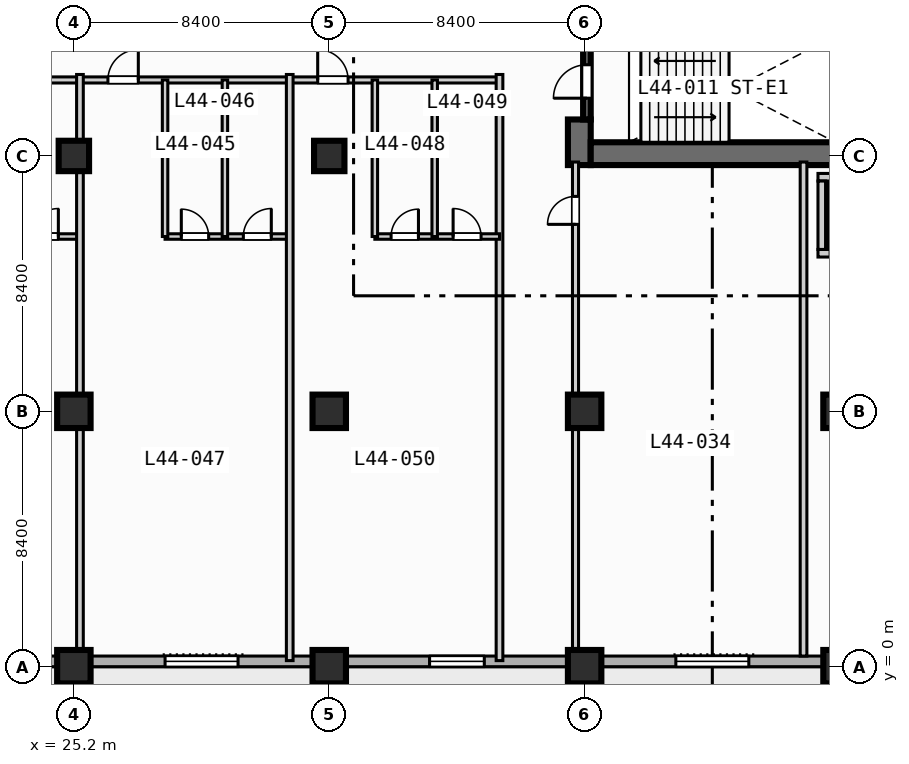
"""IFC4 building model, lengths in metres.
Left out: names, types, materials, properties, quantities, classifications, styles, units other than length and angle.
Written with IfcOpenShell. Run it as: python <this file> out.ifc"""

import sys

from ifc_helpers import new_model, si_unit, direction, frame, frame_2d, origin, origin_2d, place, context, subcontext, project, spatial, rectangle, extrude, element, fill, save


model = new_model("IFC4")
c1 = context("Model", 3, precision=1e-05, world=origin(), true_north=direction((0.0, 1.0)))
c2 = subcontext(c1, "Body", "Model", "MODEL_VIEW")
j1 = project(units=[si_unit("LENGTHUNIT", "METRE"), si_unit("PLANEANGLEUNIT", "RADIAN")], contexts=[c1])
p1 = place(None, origin())
s1 = spatial("IfcSite", under=j1, at=p1, CompositionType="ELEMENT")
p2 = place(p1, origin())
s2 = spatial("IfcBuilding", under=s1, at=p2, CompositionType="ELEMENT")
p3 = place(p2, frame((0.0, 0.0, 182.8)))
s3 = spatial("IfcBuildingStorey", under=s2, at=p3, CompositionType="ELEMENT", Elevation=182.8)
p4 = place(p3, frame((41.825, 16.5, 0.0), z_axis=(0.0, 0.0, 1.0), x_axis=(0.0, 1.0, 0.0)))
e1 = element("IfcWall", 1, at=p4, inside=s3, PredefinedType="SHEAR", context=c2, shape_type="SweptSolid", body=[
    extrude(rectangle(XDim=1.5, YDim=0.75, at=frame_2d((0.75, 0.0))), origin(), (0.0, 0.0, 1.0), 3.47),
])
p5 = place(p3, frame((42.2, 16.875, 0.0), z_axis=(0.0, 0.0, 1.0), x_axis=(1.0, 0.0, 0.0)))
e2 = element("IfcWall", 2, at=p5, inside=s3, PredefinedType="SHEAR", context=c2, shape_type="SweptSolid", body=[
    extrude(rectangle(XDim=16.35, YDim=0.75, at=frame_2d((8.175, 0.0))), origin(), (0.0, 0.0, 1.0), 3.47),
])
for number, where, z_axis, x_axis in (
    (3, (25.2, 0.0, 0.0), (0.0, 0.0, 1.0), (1.0, 0.0, 0.0)),
    (4, (25.2, 8.4, 0.0), (0.0, 0.0, 1.0), (1.0, 0.0, 0.0)),
):
    element("IfcColumn", number, at=place(p3, frame(where, z_axis=z_axis, x_axis=x_axis)), inside=s3, PredefinedType="COLUMN", context=c2, shape_type="SweptSolid", body=[
        extrude(rectangle(XDim=1.1, YDim=1.1, at=origin_2d()), origin(), (0.0, 0.0, 1.0), 3.7),
    ])
p6 = place(p3, frame((25.2, 16.8, 0.0), z_axis=(0.0, 0.0, 1.0), x_axis=(1.0, 0.0, 0.0)))
e5 = element("IfcColumn", 5, at=p6, inside=s3, PredefinedType="COLUMN", context=c2, shape_type="SweptSolid", body=[
    extrude(rectangle(XDim=1.0, YDim=1.0, at=origin_2d()), origin(), (0.0, 0.0, 1.0), 3.7),
])
for number, where, z_axis, x_axis in (
    (6, (33.6, 0.0, 0.0), (0.0, 0.0, 1.0), (1.0, 0.0, 0.0)),
    (7, (33.6, 8.4, 0.0), (0.0, 0.0, 1.0), (1.0, 0.0, 0.0)),
):
    element("IfcColumn", number, at=place(p3, frame(where, z_axis=z_axis, x_axis=x_axis)), inside=s3, PredefinedType="COLUMN", context=c2, shape_type="SweptSolid", body=[
        extrude(rectangle(XDim=1.1, YDim=1.1, at=origin_2d()), origin(), (0.0, 0.0, 1.0), 3.7),
    ])
p7 = place(p3, frame((33.6, 16.8, 0.0), z_axis=(0.0, 0.0, 1.0), x_axis=(1.0, 0.0, 0.0)))
e8 = element("IfcColumn", 8, at=p7, inside=s3, PredefinedType="COLUMN", context=c2, shape_type="SweptSolid", body=[
    extrude(rectangle(XDim=1.0, YDim=1.0, at=origin_2d()), origin(), (0.0, 0.0, 1.0), 3.7),
])
for number, where, z_axis, x_axis in (
    (9, (42.0, 0.0, 0.0), (0.0, 0.0, 1.0), (1.0, 0.0, 0.0)),
    (10, (42.0, 8.4, 0.0), (0.0, 0.0, 1.0), (1.0, 0.0, 0.0)),
    (11, (50.4, 0.0, 0.0), (0.0, 0.0, 1.0), (1.0, 0.0, 0.0)),
    (12, (50.4, 8.4, 0.0), (0.0, 0.0, 1.0), (1.0, 0.0, 0.0)),
):
    element("IfcColumn", number, at=place(p3, frame(where, z_axis=z_axis, x_axis=x_axis)), inside=s3, PredefinedType="COLUMN", context=c2, shape_type="SweptSolid", body=[
        extrude(rectangle(XDim=1.1, YDim=1.1, at=origin_2d()), origin(), (0.0, 0.0, 1.0), 3.7),
    ])
p8 = place(p3, frame((72.425, 0.175, 0.0), z_axis=(0.0, 0.0, 1.0), x_axis=(-1.0, 0.0, 0.0)))
e13 = element("IfcWall", 13, at=p8, inside=s3, PredefinedType="STANDARD", context=c2, shape_type="SweptSolid", body=[
    extrude(rectangle(XDim=69.25, YDim=0.35, at=frame_2d((34.625, 0.0))), origin(), (0.0, 0.0, 1.0), 3.47),
])
p9 = place(p8, frame((50.725, 0.0, 0.0)))
e14 = element("IfcOpeningElement", 14, at=p9, cuts=e13, PredefinedType="OPENING", context=c2, shape_type="SweptSolid", body=[
    extrude(rectangle(XDim=1.4, YDim=2.2, at=frame_2d((0.7, 1.1))), frame((0.0, 0.185, 0.0), z_axis=(0.0, -1.0, 0.0), x_axis=(1.0, 0.0, 0.0)), (0.0, 0.0, 1.0), 0.37),
])
p10 = place(p8, frame((58.625, 0.0, 0.85)))
e15 = element("IfcOpeningElement", 15, at=p10, cuts=e13, PredefinedType="OPENING", context=c2, shape_type="SweptSolid", body=[
    extrude(rectangle(XDim=2.4, YDim=1.95, at=frame_2d((1.2, 0.975))), frame((0.0, 0.185, 0.0), z_axis=(0.0, -1.0, 0.0), x_axis=(1.0, 0.0, 0.0)), (0.0, 0.0, 1.0), 0.37),
])
p11 = place(p8, frame((41.825, 0.0, 0.85)))
e16 = element("IfcOpeningElement", 16, at=p11, cuts=e13, PredefinedType="OPENING", context=c2, shape_type="SweptSolid", body=[
    extrude(rectangle(XDim=2.4, YDim=1.95, at=frame_2d((1.2, 0.975))), frame((0.0, 0.185, 0.0), z_axis=(0.0, -1.0, 0.0), x_axis=(1.0, 0.0, 0.0)), (0.0, 0.0, 1.0), 0.37),
])
p12 = place(p8, frame((33.725, 0.0, 0.85)))
e17 = element("IfcOpeningElement", 17, at=p12, cuts=e13, PredefinedType="OPENING", context=c2, shape_type="SweptSolid", body=[
    extrude(rectangle(XDim=1.8, YDim=1.8, at=frame_2d((0.9, 0.9))), frame((0.0, 0.185, 0.0), z_axis=(0.0, -1.0, 0.0), x_axis=(1.0, 0.0, 0.0)), (0.0, 0.0, 1.0), 0.37),
])
p13 = place(p8, frame((25.025, 0.0, 0.85)))
e18 = element("IfcOpeningElement", 18, at=p13, cuts=e13, PredefinedType="OPENING", context=c2, shape_type="SweptSolid", body=[
    extrude(rectangle(XDim=2.4, YDim=1.95, at=frame_2d((1.2, 0.975))), frame((0.0, 0.185, 0.0), z_axis=(0.0, -1.0, 0.0), x_axis=(1.0, 0.0, 0.0)), (0.0, 0.0, 1.0), 0.37),
])
p14 = place(p8, frame((67.075, 0.0, 0.85)))
e19 = element("IfcOpeningElement", 19, at=p14, cuts=e13, PredefinedType="OPENING", context=c2, shape_type="SweptSolid", body=[
    extrude(rectangle(XDim=1.8, YDim=1.8, at=frame_2d((0.9, 0.9))), frame((0.0, 0.185, 0.0), z_axis=(0.0, -1.0, 0.0), x_axis=(1.0, 0.0, 0.0)), (0.0, 0.0, 1.0), 0.37),
])
p15 = place(p8, frame((56.39, 0.0, 0.85)))
e20 = element("IfcOpeningElement", 20, at=p15, cuts=e13, PredefinedType="OPENING", context=c2, shape_type="SweptSolid", body=[
    extrude(rectangle(XDim=0.72, YDim=1.8, at=frame_2d((0.36, 0.9))), frame((0.0, 0.185, 0.0), z_axis=(0.0, -1.0, 0.0), x_axis=(1.0, 0.0, 0.0)), (0.0, 0.0, 1.0), 0.37),
])
p16 = place(p8, frame((9.075, 0.0, 0.85)))
e21 = element("IfcOpeningElement", 21, at=p16, cuts=e13, PredefinedType="OPENING", context=c2, shape_type="SweptSolid", body=[
    extrude(rectangle(XDim=1.8, YDim=1.8, at=frame_2d((0.9, 0.9))), frame((0.0, 0.185, 0.0), z_axis=(0.0, -1.0, 0.0), x_axis=(1.0, 0.0, 0.0)), (0.0, 0.0, 1.0), 0.37),
])
p17 = place(p8, frame((2.675, 0.0, 0.85)))
e22 = element("IfcOpeningElement", 22, at=p17, cuts=e13, PredefinedType="OPENING", context=c2, shape_type="SweptSolid", body=[
    extrude(rectangle(XDim=1.8, YDim=1.8, at=frame_2d((0.9, 0.9))), frame((0.0, 0.185, 0.0), z_axis=(0.0, -1.0, 0.0), x_axis=(1.0, 0.0, 0.0)), (0.0, 0.0, 1.0), 0.37),
])
p18 = place(p3, frame((42.075, 18.0, 0.0), z_axis=(0.0, 0.0, 1.0), x_axis=(0.0, 1.0, 0.0)))
e23 = element("IfcWall", 23, at=p18, inside=s3, PredefinedType="SOLIDWALL", context=c2, shape_type="SweptSolid", body=[
    extrude(rectangle(XDim=2.5, YDim=0.25, at=frame_2d((1.25, 0.0))), origin(), (0.0, 0.0, 1.0), 3.47),
])
p19 = place(p18, frame((0.7, 0.0, 0.0)))
e24 = element("IfcOpeningElement", 24, at=p19, cuts=e23, PredefinedType="OPENING", context=c2, shape_type="SweptSolid", body=[
    extrude(rectangle(XDim=1.1, YDim=2.15, at=frame_2d((0.55, 1.075))), frame((0.0, 0.135, 0.0), z_axis=(0.0, -1.0, 0.0), x_axis=(1.0, 0.0, 0.0)), (0.0, 0.0, 1.0), 0.27),
])
p20 = place(p3, frame((49.675, 13.6, 0.0), z_axis=(0.0, 0.0, 1.0), x_axis=(1.0, 0.0, 0.0)))
e25 = element("IfcWall", 25, at=p20, inside=s3, PredefinedType="SOLIDWALL", context=c2, shape_type="SweptSolid", body=[
    extrude(rectangle(XDim=2.25, YDim=0.25, at=frame_2d((1.125, 0.0))), origin(), (0.0, 0.0, 1.0), 3.47),
])
p21 = place(p20, frame((0.4, 0.0, 0.0)))
e26 = element("IfcOpeningElement", 26, at=p21, cuts=e25, PredefinedType="OPENING", context=c2, shape_type="SweptSolid", body=[
    extrude(rectangle(XDim=1.1, YDim=2.15, at=frame_2d((0.55, 1.075))), frame((0.0, 0.135, 0.0), z_axis=(0.0, -1.0, 0.0), x_axis=(1.0, 0.0, 0.0)), (0.0, 0.0, 1.0), 0.27),
])
for number, where, z_axis, x_axis in (
    (27, (49.675, 16.1, 0.0), (0.0, 0.0, 1.0), (1.0, 0.0, 0.0)),
    (28, (49.8, 13.725, 0.0), (0.0, 0.0, 1.0), (0.0, 1.0, 0.0)),
):
    element("IfcWall", number, at=place(p3, frame(where, z_axis=z_axis, x_axis=x_axis)), inside=s3, PredefinedType="SOLIDWALL", context=c2, shape_type="SweptSolid", body=[
        extrude(rectangle(XDim=2.25, YDim=0.25, at=frame_2d((1.125, 0.0))), origin(), (0.0, 0.0, 1.0), 3.47),
    ])
p22 = place(p3, frame((41.7, 0.35, 0.0), z_axis=(0.0, 0.0, 1.0), x_axis=(0.0, 1.0, 0.0)))
e29 = element("IfcWall", 29, at=p22, inside=s3, PredefinedType="PARTITIONING", context=c2, shape_type="SweptSolid", body=[
    extrude(rectangle(XDim=16.25, YDim=0.2, at=frame_2d((8.125, 0.0))), origin(), (0.0, 0.0, 1.0), 2.82),
])
p23 = place(p22, frame((14.2, 0.0, 0.0)))
e30 = element("IfcOpeningElement", 30, at=p23, cuts=e29, PredefinedType="OPENING", context=c2, shape_type="SweptSolid", body=[
    extrude(rectangle(XDim=0.92, YDim=2.1, at=frame_2d((0.46, 1.05))), frame((0.0, 0.11, 0.0), z_axis=(0.0, -1.0, 0.0), x_axis=(1.0, 0.0, 0.0)), (0.0, 0.0, 1.0), 0.22),
])
p24 = place(p3, frame((49.2, 0.35, 0.0), z_axis=(0.0, 0.0, 1.0), x_axis=(0.0, 1.0, 0.0)))
e31 = element("IfcWall", 31, at=p24, inside=s3, PredefinedType="PARTITIONING", context=c2, shape_type="SweptSolid", body=[
    extrude(rectangle(XDim=16.25, YDim=0.22, at=frame_2d((8.125, 0.0))), origin(), (0.0, 0.0, 1.0), 3.47),
])
p25 = place(p3, frame((3.4, 19.3, 0.0), z_axis=(0.0, 0.0, 1.0), x_axis=(1.0, 0.0, 0.0)))
e32 = element("IfcWall", 32, at=p25, inside=s3, PredefinedType="PARTITIONING", context=c2, shape_type="SweptSolid", body=[
    extrude(rectangle(XDim=35.8, YDim=0.2, at=frame_2d((17.9, 0.0))), origin(), (0.0, 0.0, 1.0), 3.47),
])
p26 = place(p25, frame((3.92, 0.0, 0.0)))
e33 = element("IfcOpeningElement", 33, at=p26, cuts=e32, PredefinedType="OPENING", context=c2, shape_type="SweptSolid", body=[
    extrude(rectangle(XDim=1.0, YDim=2.15, at=frame_2d((0.5, 1.075))), frame((0.0, 0.11, 0.0), z_axis=(0.0, -1.0, 0.0), x_axis=(1.0, 0.0, 0.0)), (0.0, 0.0, 1.0), 0.22),
])
p27 = place(p25, frame((14.945, 0.0, 0.0)))
e34 = element("IfcOpeningElement", 34, at=p27, cuts=e32, PredefinedType="OPENING", context=c2, shape_type="SweptSolid", body=[
    extrude(rectangle(XDim=1.0, YDim=2.15, at=frame_2d((0.5, 1.075))), frame((0.0, 0.11, 0.0), z_axis=(0.0, -1.0, 0.0), x_axis=(1.0, 0.0, 0.0)), (0.0, 0.0, 1.0), 0.22),
])
p28 = place(p25, frame((22.92, 0.0, 0.0)))
e35 = element("IfcOpeningElement", 35, at=p28, cuts=e32, PredefinedType="OPENING", context=c2, shape_type="SweptSolid", body=[
    extrude(rectangle(XDim=1.0, YDim=2.15, at=frame_2d((0.5, 1.075))), frame((0.0, 0.11, 0.0), z_axis=(0.0, -1.0, 0.0), x_axis=(1.0, 0.0, 0.0)), (0.0, 0.0, 1.0), 0.22),
])
p29 = place(p25, frame((29.82, 0.0, 0.0)))
e36 = element("IfcOpeningElement", 36, at=p29, cuts=e32, PredefinedType="OPENING", context=c2, shape_type="SweptSolid", body=[
    extrude(rectangle(XDim=1.0, YDim=2.15, at=frame_2d((0.5, 1.075))), frame((0.0, 0.11, 0.0), z_axis=(0.0, -1.0, 0.0), x_axis=(1.0, 0.0, 0.0)), (0.0, 0.0, 1.0), 0.22),
])
p30 = place(p3, frame((20.9, 14.15, 0.0), z_axis=(0.0, 0.0, 1.0), x_axis=(1.0, 0.0, 0.0)))
e37 = element("IfcWall", 37, at=p30, inside=s3, PredefinedType="PLUMBINGWALL", context=c2, shape_type="SweptSolid", body=[
    extrude(rectangle(XDim=4.5, YDim=0.18, at=frame_2d((2.25, 0.0))), origin(), (0.0, 0.0, 1.0), 3.47),
])
p31 = place(p30, frame((0.63, 0.0, 0.0)))
e38 = element("IfcOpeningElement", 38, at=p31, cuts=e37, PredefinedType="OPENING", context=c2, shape_type="SweptSolid", body=[
    extrude(rectangle(XDim=0.9, YDim=2.1, at=frame_2d((0.45, 1.05))), frame((0.0, 0.1, 0.0), z_axis=(0.0, -1.0, 0.0), x_axis=(1.0, 0.0, 0.0)), (0.0, 0.0, 1.0), 0.2),
])
p32 = place(p30, frame((2.87, 0.0, 0.0)))
e39 = element("IfcOpeningElement", 39, at=p32, cuts=e37, PredefinedType="OPENING", context=c2, shape_type="SweptSolid", body=[
    extrude(rectangle(XDim=0.92, YDim=2.1, at=frame_2d((0.46, 1.05))), frame((0.0, 0.1, 0.0), z_axis=(0.0, -1.0, 0.0), x_axis=(1.0, 0.0, 0.0)), (0.0, 0.0, 1.0), 0.2),
])
p33 = place(p3, frame((25.4, 0.2, 0.0), z_axis=(0.0, 0.0, 1.0), x_axis=(0.0, 1.0, 0.0)))
e40 = element("IfcWall", 40, at=p33, inside=s3, PredefinedType="PARTITIONING", context=c2, shape_type="SweptSolid", body=[
    extrude(rectangle(XDim=19.28, YDim=0.22, at=frame_2d((9.64, 0.0))), origin(), (0.0, 0.0, 1.0), 2.82),
])
p34 = place(p3, frame((28.2, 14.15, 0.0), z_axis=(0.0, 0.0, 1.0), x_axis=(1.0, 0.0, 0.0)))
e41 = element("IfcWall", 41, at=p34, inside=s3, PredefinedType="PLUMBINGWALL", context=c2, shape_type="SweptSolid", body=[
    extrude(rectangle(XDim=4.1, YDim=0.18, at=frame_2d((2.05, 0.0))), origin(), (0.0, 0.0, 1.0), 3.47),
])
p35 = place(p34, frame((0.534, 0.0, 0.0)))
e42 = element("IfcOpeningElement", 42, at=p35, cuts=e41, PredefinedType="OPENING", context=c2, shape_type="SweptSolid", body=[
    extrude(rectangle(XDim=0.9, YDim=2.1, at=frame_2d((0.45, 1.05))), frame((0.0, 0.1, 0.0), z_axis=(0.0, -1.0, 0.0), x_axis=(1.0, 0.0, 0.0)), (0.0, 0.0, 1.0), 0.2),
])
p36 = place(p34, frame((2.574, 0.0, 0.0)))
e43 = element("IfcOpeningElement", 43, at=p36, cuts=e41, PredefinedType="OPENING", context=c2, shape_type="SweptSolid", body=[
    extrude(rectangle(XDim=0.92, YDim=2.1, at=frame_2d((0.46, 1.05))), frame((0.0, 0.1, 0.0), z_axis=(0.0, -1.0, 0.0), x_axis=(1.0, 0.0, 0.0)), (0.0, 0.0, 1.0), 0.2),
])
for number, where, z_axis, x_axis in (
    (44, (28.2, 14.15, 0.0), (0.0, 0.0, 1.0), (0.0, 1.0, 0.0)),
    (45, (30.168, 14.15, 0.0), (0.0, 0.0, 1.0), (0.0, 1.0, 0.0)),
):
    element("IfcWall", number, at=place(p3, frame(where, z_axis=z_axis, x_axis=x_axis)), inside=s3, PredefinedType="PLUMBINGWALL", context=c2, shape_type="SweptSolid", body=[
        extrude(rectangle(XDim=5.15, YDim=0.18, at=frame_2d((2.575, 0.0))), origin(), (0.0, 0.0, 1.0), 3.47),
    ])
for number, where, z_axis, x_axis in (
    (46, (32.3, 0.2, 0.0), (0.0, 0.0, 1.0), (0.0, 1.0, 0.0)),
    (47, (39.2, 0.2, 0.0), (0.0, 0.0, 1.0), (0.0, 1.0, 0.0)),
):
    element("IfcWall", number, at=place(p3, frame(where, z_axis=z_axis, x_axis=x_axis)), inside=s3, PredefinedType="PARTITIONING", context=c2, shape_type="SweptSolid", body=[
        extrude(rectangle(XDim=19.28, YDim=0.22, at=frame_2d((9.64, 0.0))), origin(), (0.0, 0.0, 1.0), 3.47),
    ])
p37 = place(p3, frame((35.1, 14.15, 0.0), z_axis=(0.0, 0.0, 1.0), x_axis=(1.0, 0.0, 0.0)))
e48 = element("IfcWall", 48, at=p37, inside=s3, PredefinedType="PLUMBINGWALL", context=c2, shape_type="SweptSolid", body=[
    extrude(rectangle(XDim=4.1, YDim=0.18, at=frame_2d((2.05, 0.0))), origin(), (0.0, 0.0, 1.0), 3.47),
])
p38 = place(p37, frame((0.534, 0.0, 0.0)))
e49 = element("IfcOpeningElement", 49, at=p38, cuts=e48, PredefinedType="OPENING", context=c2, shape_type="SweptSolid", body=[
    extrude(rectangle(XDim=0.9, YDim=2.1, at=frame_2d((0.45, 1.05))), frame((0.0, 0.1, 0.0), z_axis=(0.0, -1.0, 0.0), x_axis=(1.0, 0.0, 0.0)), (0.0, 0.0, 1.0), 0.2),
])
p39 = place(p37, frame((2.574, 0.0, 0.0)))
e50 = element("IfcOpeningElement", 50, at=p39, cuts=e48, PredefinedType="OPENING", context=c2, shape_type="SweptSolid", body=[
    extrude(rectangle(XDim=0.92, YDim=2.1, at=frame_2d((0.46, 1.05))), frame((0.0, 0.1, 0.0), z_axis=(0.0, -1.0, 0.0), x_axis=(1.0, 0.0, 0.0)), (0.0, 0.0, 1.0), 0.2),
])
for number, where, z_axis, x_axis in (
    (51, (35.1, 14.15, 0.0), (0.0, 0.0, 1.0), (0.0, 1.0, 0.0)),
    (52, (37.068, 14.15, 0.0), (0.0, 0.0, 1.0), (0.0, 1.0, 0.0)),
):
    element("IfcWall", number, at=place(p3, frame(where, z_axis=z_axis, x_axis=x_axis)), inside=s3, PredefinedType="PLUMBINGWALL", context=c2, shape_type="SweptSolid", body=[
        extrude(rectangle(XDim=5.15, YDim=0.18, at=frame_2d((2.575, 0.0))), origin(), (0.0, 0.0, 1.0), 3.47),
    ])
p40 = place(p11, origin())
e53 = element("IfcWindow", 53, at=p40, inside=s3, PartitioningType="SINGLE_PANEL", PredefinedType="WINDOW", context=c2, shape_type="SweptSolid", body=[
    extrude(rectangle(XDim=2.4, YDim=1.95, at=frame_2d((1.2, 0.975))), frame((0.0, 0.03, 0.0), z_axis=(0.0, -1.0, 0.0), x_axis=(1.0, 0.0, 0.0)), (0.0, 0.0, 1.0), 0.06),
])
fill(e16, e53)
p41 = place(p12, origin())
e54 = element("IfcWindow", 54, at=p41, inside=s3, PartitioningType="SINGLE_PANEL", PredefinedType="WINDOW", context=c2, shape_type="SweptSolid", body=[
    extrude(rectangle(XDim=1.8, YDim=1.8, at=frame_2d((0.9, 0.9))), frame((0.0, 0.03, 0.0), z_axis=(0.0, -1.0, 0.0), x_axis=(1.0, 0.0, 0.0)), (0.0, 0.0, 1.0), 0.06),
])
fill(e17, e54)
p42 = place(p13, origin())
e55 = element("IfcWindow", 55, at=p42, inside=s3, PartitioningType="SINGLE_PANEL", PredefinedType="WINDOW", context=c2, shape_type="SweptSolid", body=[
    extrude(rectangle(XDim=2.4, YDim=1.95, at=frame_2d((1.2, 0.975))), frame((0.0, 0.03, 0.0), z_axis=(0.0, -1.0, 0.0), x_axis=(1.0, 0.0, 0.0)), (0.0, 0.0, 1.0), 0.06),
])
fill(e18, e55)
p43 = place(p19, origin())
e56 = element("IfcDoor", 56, at=p43, inside=s3, OperationType="SINGLE_SWING_LEFT", PredefinedType="DOOR", context=c2, shape_type="SweptSolid", body=[
    extrude(rectangle(XDim=1.1, YDim=2.15, at=frame_2d((0.55, 1.075))), frame((0.0, 0.025, 0.0), z_axis=(0.0, -1.0, 0.0), x_axis=(1.0, 0.0, 0.0)), (0.0, 0.0, 1.0), 0.05),
])
fill(e24, e56)
p44 = place(p23, origin())
e57 = element("IfcDoor", 57, at=p44, inside=s3, OperationType="SINGLE_SWING_LEFT", PredefinedType="DOOR", context=c2, shape_type="SweptSolid", body=[
    extrude(rectangle(XDim=0.92, YDim=2.1, at=frame_2d((0.46, 1.05))), frame((0.0, 0.025, 0.0), z_axis=(0.0, -1.0, 0.0), x_axis=(1.0, 0.0, 0.0)), (0.0, 0.0, 1.0), 0.05),
])
fill(e30, e57)
p45 = place(p28, origin())
e58 = element("IfcDoor", 58, at=p45, inside=s3, OperationType="SINGLE_SWING_RIGHT", PredefinedType="DOOR", context=c2, shape_type="SweptSolid", body=[
    extrude(rectangle(XDim=1.0, YDim=2.15, at=frame_2d((0.5, 1.075))), frame((0.0, 0.025, 0.0), z_axis=(0.0, -1.0, 0.0), x_axis=(1.0, 0.0, 0.0)), (0.0, 0.0, 1.0), 0.05),
])
fill(e35, e58)
p46 = place(p29, origin())
e59 = element("IfcDoor", 59, at=p46, inside=s3, OperationType="SINGLE_SWING_LEFT", PredefinedType="DOOR", context=c2, shape_type="SweptSolid", body=[
    extrude(rectangle(XDim=1.0, YDim=2.15, at=frame_2d((0.5, 1.075))), frame((0.0, 0.025, 0.0), z_axis=(0.0, -1.0, 0.0), x_axis=(1.0, 0.0, 0.0)), (0.0, 0.0, 1.0), 0.05),
])
fill(e36, e59)
p47 = place(p32, origin())
e60 = element("IfcDoor", 60, at=p47, inside=s3, OperationType="SINGLE_SWING_RIGHT", PredefinedType="DOOR", context=c2, shape_type="SweptSolid", body=[
    extrude(rectangle(XDim=0.92, YDim=2.1, at=frame_2d((0.46, 1.05))), frame((0.0, 0.025, 0.0), z_axis=(0.0, -1.0, 0.0), x_axis=(1.0, 0.0, 0.0)), (0.0, 0.0, 1.0), 0.05),
])
fill(e39, e60)
p48 = place(p35, origin())
e61 = element("IfcDoor", 61, at=p48, inside=s3, OperationType="SINGLE_SWING_LEFT", PredefinedType="DOOR", context=c2, shape_type="SweptSolid", body=[
    extrude(rectangle(XDim=0.9, YDim=2.1, at=frame_2d((0.45, 1.05))), frame((0.0, 0.025, 0.0), z_axis=(0.0, -1.0, 0.0), x_axis=(1.0, 0.0, 0.0)), (0.0, 0.0, 1.0), 0.05),
])
fill(e42, e61)
p49 = place(p36, origin())
e62 = element("IfcDoor", 62, at=p49, inside=s3, OperationType="SINGLE_SWING_RIGHT", PredefinedType="DOOR", context=c2, shape_type="SweptSolid", body=[
    extrude(rectangle(XDim=0.92, YDim=2.1, at=frame_2d((0.46, 1.05))), frame((0.0, 0.025, 0.0), z_axis=(0.0, -1.0, 0.0), x_axis=(1.0, 0.0, 0.0)), (0.0, 0.0, 1.0), 0.05),
])
fill(e43, e62)
p50 = place(p38, origin())
e63 = element("IfcDoor", 63, at=p50, inside=s3, OperationType="SINGLE_SWING_RIGHT", PredefinedType="DOOR", context=c2, shape_type="SweptSolid", body=[
    extrude(rectangle(XDim=0.9, YDim=2.1, at=frame_2d((0.45, 1.05))), frame((0.0, 0.025, 0.0), z_axis=(0.0, -1.0, 0.0), x_axis=(1.0, 0.0, 0.0)), (0.0, 0.0, 1.0), 0.05),
])
fill(e49, e63)
p51 = place(p39, origin())
e64 = element("IfcDoor", 64, at=p51, inside=s3, OperationType="SINGLE_SWING_LEFT", PredefinedType="DOOR", context=c2, shape_type="SweptSolid", body=[
    extrude(rectangle(XDim=0.92, YDim=2.1, at=frame_2d((0.46, 1.05))), frame((0.0, 0.025, 0.0), z_axis=(0.0, -1.0, 0.0), x_axis=(1.0, 0.0, 0.0)), (0.0, 0.0, 1.0), 0.05),
])
fill(e50, e64)
save(model, sys.argv[1])
